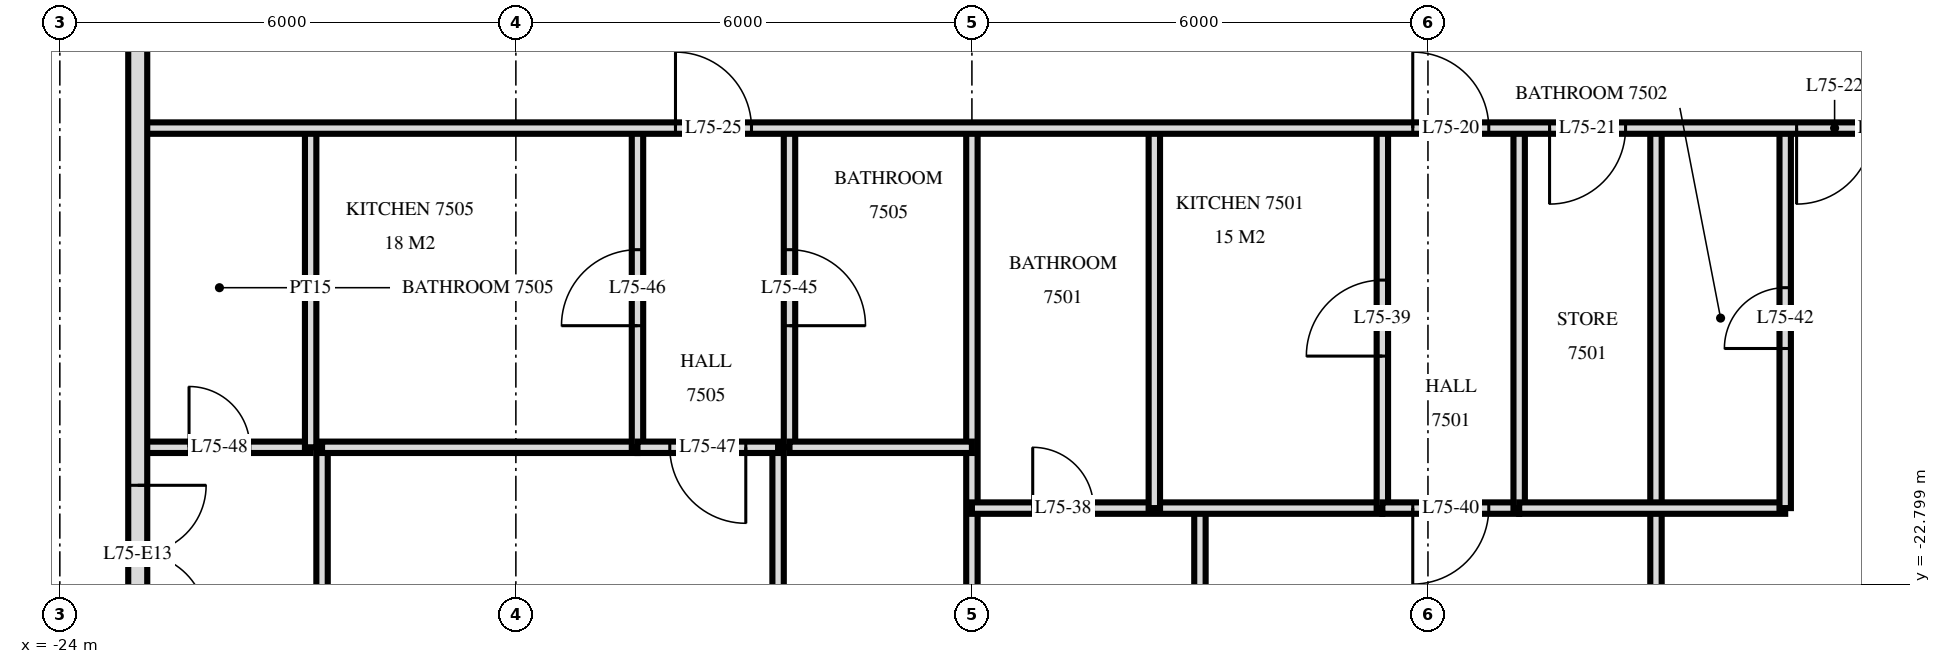
"""IFC4 building model, lengths in metres.
Left out: names, types, materials, properties, quantities, classifications, styles, units other than length and angle.
Written with IfcOpenShell. Run it as: python <this file> out.ifc"""

import sys

from ifc_helpers import new_model, si_unit, direction, frame, frame_2d, origin, place, context, subcontext, project, spatial, rectangle, extrude, element, fill, save


model = new_model("IFC4")
c1 = context("Model", 3, precision=1e-05, world=origin(), true_north=direction((0.0, 1.0)))
c2 = subcontext(c1, "Body", "Model", "MODEL_VIEW")
j1 = project(units=[si_unit("LENGTHUNIT", "METRE"), si_unit("PLANEANGLEUNIT", "RADIAN")], contexts=[c1])
p1 = place(None, origin())
s1 = spatial("IfcSite", under=j1, at=p1, CompositionType="ELEMENT")
p2 = place(p1, origin())
s2 = spatial("IfcBuilding", under=s1, at=p2, CompositionType="ELEMENT")
p3 = place(p2, frame((0.0, 0.0, 284.1)))
s3 = spatial("IfcBuildingStorey", under=s2, at=p3, CompositionType="ELEMENT", Elevation=284.1)
p4 = place(p3, frame((-22.975, -3.325, 0.0), z_axis=(0.0, 0.0, 1.0), x_axis=(0.0, -1.0, 0.0)))
e1 = element("IfcWall", 1, at=p4, inside=s3, PredefinedType="SOLIDWALL", context=c2, shape_type="SweptSolid", body=[
    extrude(rectangle(XDim=25.951, YDim=0.25, at=frame_2d((12.975, 0.0))), origin(), (0.0, 0.0, 1.0), 3.22),
])
p5 = place(p4, frame((1.475, 0.0, 0.0)))
e2 = element("IfcOpeningElement", 2, at=p5, cuts=e1, PredefinedType="OPENING", context=c2, shape_type="SweptSolid", body=[
    extrude(rectangle(XDim=1.8, YDim=2.4, at=frame_2d((0.9, 1.2))), frame((0.0, 0.135, 0.0), z_axis=(0.0, -1.0, 0.0), x_axis=(1.0, 0.0, 0.0)), (0.0, 0.0, 1.0), 0.27),
])
p6 = place(p4, frame((7.975, 0.0, 0.0)))
e3 = element("IfcOpeningElement", 3, at=p6, cuts=e1, PredefinedType="OPENING", context=c2, shape_type="SweptSolid", body=[
    extrude(rectangle(XDim=1.8, YDim=2.4, at=frame_2d((0.9, 1.2))), frame((0.0, 0.135, 0.0), z_axis=(0.0, -1.0, 0.0), x_axis=(1.0, 0.0, 0.0)), (0.0, 0.0, 1.0), 0.27),
])
p7 = place(p4, frame((18.175, 0.0, 0.0)))
e4 = element("IfcOpeningElement", 4, at=p7, cuts=e1, PredefinedType="OPENING", context=c2, shape_type="SweptSolid", body=[
    extrude(rectangle(XDim=1.8, YDim=2.4, at=frame_2d((0.9, 1.2))), frame((0.0, 0.135, 0.0), z_axis=(0.0, -1.0, 0.0), x_axis=(1.0, 0.0, 0.0)), (0.0, 0.0, 1.0), 0.27),
])
p8 = place(p4, frame((21.075, 0.0, 0.0)))
e5 = element("IfcOpeningElement", 5, at=p8, cuts=e1, PredefinedType="OPENING", context=c2, shape_type="SweptSolid", body=[
    extrude(rectangle(XDim=1.8, YDim=2.4, at=frame_2d((0.9, 1.2))), frame((0.0, 0.135, 0.0), z_axis=(0.0, -1.0, 0.0), x_axis=(1.0, 0.0, 0.0)), (0.0, 0.0, 1.0), 0.27),
])
p9 = place(p4, frame((23.825, 0.0, 0.9)))
e6 = element("IfcOpeningElement", 6, at=p9, cuts=e1, PredefinedType="OPENING", context=c2, shape_type="SweptSolid", body=[
    extrude(rectangle(XDim=1.8, YDim=1.5, at=frame_2d((0.9, 0.75))), frame((0.0, 0.135, 0.0), z_axis=(0.0, -1.0, 0.0), x_axis=(1.0, 0.0, 0.0)), (0.0, 0.0, 1.0), 0.27),
])
p10 = place(p3, frame((-1.3, -21.8, 0.0), z_axis=(0.0, 0.0, 1.0), x_axis=(0.0, 1.0, 0.0)))
e7 = element("IfcWall", 7, at=p10, inside=s3, PredefinedType="PARTITIONING", context=c2, shape_type="SweptSolid", body=[
    extrude(rectangle(XDim=5.0, YDim=0.15, at=frame_2d((2.5, 0.0))), origin(), (0.0, 0.0, 1.0), 3.22),
])
p11 = place(p10, frame((2.1, 0.0, 0.0)))
e8 = element("IfcOpeningElement", 8, at=p11, cuts=e7, PredefinedType="OPENING", context=c2, shape_type="SweptSolid", body=[
    extrude(rectangle(XDim=0.8, YDim=2.1, at=frame_2d((0.4, 1.05))), frame((0.0, 0.085, 0.0), z_axis=(0.0, -1.0, 0.0), x_axis=(1.0, 0.0, 0.0)), (0.0, 0.0, 1.0), 0.17),
])
p12 = place(p3, frame((-3.0, -33.62, 0.0), z_axis=(0.0, 0.0, 1.0), x_axis=(0.0, 1.0, 0.0)))
e9 = element("IfcWall", 9, at=p12, inside=s3, PredefinedType="PARTITIONING", context=c2, shape_type="SweptSolid", body=[
    extrude(rectangle(XDim=16.82, YDim=0.15, at=frame_2d((8.41, 0.0))), origin(), (0.0, 0.0, 1.0), 3.22),
])
p13 = place(p3, frame((-4.8, -21.8, 0.0), z_axis=(0.0, 0.0, 1.0), x_axis=(0.0, 1.0, 0.0)))
e10 = element("IfcWall", 10, at=p13, inside=s3, PredefinedType="PARTITIONING", context=c2, shape_type="SweptSolid", body=[
    extrude(rectangle(XDim=5.0, YDim=0.15, at=frame_2d((2.5, 0.0))), origin(), (0.0, 0.0, 1.0), 3.22),
])
p14 = place(p3, frame((-6.6, -21.8, 0.0), z_axis=(0.0, 0.0, 1.0), x_axis=(0.0, 1.0, 0.0)))
e11 = element("IfcWall", 11, at=p14, inside=s3, PredefinedType="PARTITIONING", context=c2, shape_type="SweptSolid", body=[
    extrude(rectangle(XDim=5.0, YDim=0.15, at=frame_2d((2.5, 0.0))), origin(), (0.0, 0.0, 1.0), 3.22),
])
p15 = place(p14, frame((2.0, 0.0, 0.0)))
e12 = element("IfcOpeningElement", 12, at=p15, cuts=e11, PredefinedType="OPENING", context=c2, shape_type="SweptSolid", body=[
    extrude(rectangle(XDim=1.0, YDim=2.1, at=frame_2d((0.5, 1.05))), frame((0.0, 0.085, 0.0), z_axis=(0.0, -1.0, 0.0), x_axis=(1.0, 0.0, 0.0)), (0.0, 0.0, 1.0), 0.17),
])
p16 = place(p3, frame((-9.0, -33.62, 0.0), z_axis=(0.0, 0.0, 1.0), x_axis=(0.0, 1.0, 0.0)))
e13 = element("IfcWall", 13, at=p16, inside=s3, PredefinedType="PARTITIONING", context=c2, shape_type="SweptSolid", body=[
    extrude(rectangle(XDim=11.82, YDim=0.15, at=frame_2d((5.91, 0.0))), origin(), (0.0, 0.0, 1.0), 3.22),
])
p17 = place(p16, frame((5.37, 0.0, 0.0)))
e14 = element("IfcOpeningElement", 14, at=p17, cuts=e13, PredefinedType="OPENING", context=c2, shape_type="SweptSolid", body=[
    extrude(rectangle(XDim=0.9, YDim=2.1, at=frame_2d((0.45, 1.05))), frame((0.0, 0.085, 0.0), z_axis=(0.0, -1.0, 0.0), x_axis=(1.0, 0.0, 0.0)), (0.0, 0.0, 1.0), 0.17),
])
p18 = place(p3, frame((-9.6, -21.8, 0.0), z_axis=(0.0, 0.0, 1.0), x_axis=(0.0, 1.0, 0.0)))
e15 = element("IfcWall", 15, at=p18, inside=s3, PredefinedType="PARTITIONING", context=c2, shape_type="SweptSolid", body=[
    extrude(rectangle(XDim=5.0, YDim=0.15, at=frame_2d((2.5, 0.0))), origin(), (0.0, 0.0, 1.0), 3.22),
])
p19 = place(p3, frame((-12.0, -33.62, 0.0), z_axis=(0.0, 0.0, 1.0), x_axis=(0.0, 1.0, 0.0)))
e16 = element("IfcWall", 16, at=p19, inside=s3, PredefinedType="PARTITIONING", context=c2, shape_type="SweptSolid", body=[
    extrude(rectangle(XDim=16.82, YDim=0.15, at=frame_2d((8.41, 0.0))), origin(), (0.0, 0.0, 1.0), 3.22),
])
p20 = place(p3, frame((-14.4, -21.0, 0.0), z_axis=(0.0, 0.0, 1.0), x_axis=(0.0, 1.0, 0.0)))
e17 = element("IfcWall", 17, at=p20, inside=s3, PredefinedType="PARTITIONING", context=c2, shape_type="SweptSolid", body=[
    extrude(rectangle(XDim=4.2, YDim=0.15, at=frame_2d((2.1, 0.0))), origin(), (0.0, 0.0, 1.0), 3.22),
])
p21 = place(p20, frame((1.6, 0.0, 0.0)))
e18 = element("IfcOpeningElement", 18, at=p21, cuts=e17, PredefinedType="OPENING", context=c2, shape_type="SweptSolid", body=[
    extrude(rectangle(XDim=1.0, YDim=2.1, at=frame_2d((0.5, 1.05))), frame((0.0, 0.085, 0.0), z_axis=(0.0, -1.0, 0.0), x_axis=(1.0, 0.0, 0.0)), (0.0, 0.0, 1.0), 0.17),
])
p22 = place(p3, frame((-14.55, -33.62, 0.0), z_axis=(0.0, 0.0, 1.0), x_axis=(0.0, 1.0, 0.0)))
e19 = element("IfcWall", 19, at=p22, inside=s3, PredefinedType="PARTITIONING", context=c2, shape_type="SweptSolid", body=[
    extrude(rectangle(XDim=12.62, YDim=0.15, at=frame_2d((6.31, 0.0))), origin(), (0.0, 0.0, 1.0), 3.22),
])
p23 = place(p22, frame((5.77, 0.0, 0.0)))
e20 = element("IfcOpeningElement", 20, at=p23, cuts=e19, PredefinedType="OPENING", context=c2, shape_type="SweptSolid", body=[
    extrude(rectangle(XDim=0.9, YDim=2.1, at=frame_2d((0.45, 1.05))), frame((0.0, 0.085, 0.0), z_axis=(0.0, -1.0, 0.0), x_axis=(1.0, 0.0, 0.0)), (0.0, 0.0, 1.0), 0.17),
])
p24 = place(p3, frame((-16.4, -21.0, 0.0), z_axis=(0.0, 0.0, 1.0), x_axis=(0.0, 1.0, 0.0)))
e21 = element("IfcWall", 21, at=p24, inside=s3, PredefinedType="PARTITIONING", context=c2, shape_type="SweptSolid", body=[
    extrude(rectangle(XDim=4.2, YDim=0.15, at=frame_2d((2.1, 0.0))), origin(), (0.0, 0.0, 1.0), 3.22),
])
p25 = place(p24, frame((1.6, 0.0, 0.0)))
e22 = element("IfcOpeningElement", 22, at=p25, cuts=e21, PredefinedType="OPENING", context=c2, shape_type="SweptSolid", body=[
    extrude(rectangle(XDim=1.0, YDim=2.1, at=frame_2d((0.5, 1.05))), frame((0.0, 0.085, 0.0), z_axis=(0.0, -1.0, 0.0), x_axis=(1.0, 0.0, 0.0)), (0.0, 0.0, 1.0), 0.17),
])
p26 = place(p3, frame((-20.55, -33.017, 0.0), z_axis=(0.0, 0.0, 1.0), x_axis=(0.0, 1.0, 0.0)))
e23 = element("IfcWall", 23, at=p26, inside=s3, PredefinedType="PARTITIONING", context=c2, shape_type="SweptSolid", body=[
    extrude(rectangle(XDim=12.017, YDim=0.15, at=frame_2d((6.008, 0.0))), origin(), (0.0, 0.0, 1.0), 3.22),
])
p27 = place(p26, frame((5.432, 0.0, 0.0)))
e24 = element("IfcOpeningElement", 24, at=p27, cuts=e23, PredefinedType="OPENING", context=c2, shape_type="SweptSolid", body=[
    extrude(rectangle(XDim=0.9, YDim=2.1, at=frame_2d((0.45, 1.05))), frame((0.0, 0.085, 0.0), z_axis=(0.0, -1.0, 0.0), x_axis=(1.0, 0.0, 0.0)), (0.0, 0.0, 1.0), 0.17),
])
p28 = place(p3, frame((-20.7, -21.0, 0.0), z_axis=(0.0, 0.0, 1.0), x_axis=(0.0, 1.0, 0.0)))
e25 = element("IfcWall", 25, at=p28, inside=s3, PredefinedType="PARTITIONING", context=c2, shape_type="SweptSolid", body=[
    extrude(rectangle(XDim=4.2, YDim=0.15, at=frame_2d((2.1, 0.0))), origin(), (0.0, 0.0, 1.0), 3.22),
])
p29 = place(p3, frame((-6.6, -21.8, 0.0), z_axis=(0.0, 0.0, 1.0), x_axis=(1.0, 0.0, 0.0)))
e26 = element("IfcWall", 26, at=p29, inside=s3, PredefinedType="PARTITIONING", context=c2, shape_type="SweptSolid", body=[
    extrude(rectangle(XDim=1.8, YDim=0.15, at=frame_2d((0.9, 0.0))), origin(), (0.0, 0.0, 1.0), 3.22),
])
p30 = place(p29, frame((0.4, 0.0, 0.0)))
e27 = element("IfcOpeningElement", 27, at=p30, cuts=e26, PredefinedType="OPENING", context=c2, shape_type="SweptSolid", body=[
    extrude(rectangle(XDim=1.0, YDim=2.1, at=frame_2d((0.5, 1.05))), frame((0.0, 0.085, 0.0), z_axis=(0.0, -1.0, 0.0), x_axis=(1.0, 0.0, 0.0)), (0.0, 0.0, 1.0), 0.17),
])
p31 = place(p3, frame((-12.0, -21.8, 0.0), z_axis=(0.0, 0.0, 1.0), x_axis=(1.0, 0.0, 0.0)))
e28 = element("IfcWall", 28, at=p31, inside=s3, PredefinedType="PARTITIONING", context=c2, shape_type="SweptSolid", body=[
    extrude(rectangle(XDim=5.4, YDim=0.15, at=frame_2d((2.7, 0.0))), origin(), (0.0, 0.0, 1.0), 3.22),
])
p32 = place(p31, frame((0.8, 0.0, 0.0)))
e29 = element("IfcOpeningElement", 29, at=p32, cuts=e28, PredefinedType="OPENING", context=c2, shape_type="SweptSolid", body=[
    extrude(rectangle(XDim=0.8, YDim=2.1, at=frame_2d((0.4, 1.05))), frame((0.0, 0.085, 0.0), z_axis=(0.0, -1.0, 0.0), x_axis=(1.0, 0.0, 0.0)), (0.0, 0.0, 1.0), 0.17),
])
p33 = place(p3, frame((-4.8, -21.8, 0.0), z_axis=(0.0, 0.0, 1.0), x_axis=(1.0, 0.0, 0.0)))
e30 = element("IfcWall", 30, at=p33, inside=s3, PredefinedType="PARTITIONING", context=c2, shape_type="SweptSolid", body=[
    extrude(rectangle(XDim=3.5, YDim=0.15, at=frame_2d((1.75, 0.0))), origin(), (0.0, 0.0, 1.0), 3.22),
])
p34 = place(p3, frame((-16.4, -21.0, 0.0), z_axis=(0.0, 0.0, 1.0), x_axis=(1.0, 0.0, 0.0)))
e31 = element("IfcWall", 31, at=p34, inside=s3, PredefinedType="PARTITIONING", context=c2, shape_type="SweptSolid", body=[
    extrude(rectangle(XDim=1.85, YDim=0.15, at=frame_2d((0.925, 0.0))), origin(), (0.0, 0.0, 1.0), 3.22),
])
p35 = place(p34, frame((0.425, 0.0, 0.0)))
e32 = element("IfcOpeningElement", 32, at=p35, cuts=e31, PredefinedType="OPENING", context=c2, shape_type="SweptSolid", body=[
    extrude(rectangle(XDim=1.0, YDim=2.1, at=frame_2d((0.5, 1.05))), frame((0.0, 0.085, 0.0), z_axis=(0.0, -1.0, 0.0), x_axis=(1.0, 0.0, 0.0)), (0.0, 0.0, 1.0), 0.17),
])
p36 = place(p3, frame((-22.92, -21.0, 0.0), z_axis=(0.0, 0.0, 1.0), x_axis=(1.0, 0.0, 0.0)))
e33 = element("IfcWall", 33, at=p36, inside=s3, PredefinedType="PARTITIONING", context=c2, shape_type="SweptSolid", body=[
    extrude(rectangle(XDim=2.22, YDim=0.15, at=frame_2d((1.11, 0.0))), origin(), (0.0, 0.0, 1.0), 3.22),
])
p37 = place(p36, frame((0.62, 0.0, 0.0)))
e34 = element("IfcOpeningElement", 34, at=p37, cuts=e33, PredefinedType="OPENING", context=c2, shape_type="SweptSolid", body=[
    extrude(rectangle(XDim=0.8, YDim=2.1, at=frame_2d((0.4, 1.05))), frame((0.0, 0.085, 0.0), z_axis=(0.0, -1.0, 0.0), x_axis=(1.0, 0.0, 0.0)), (0.0, 0.0, 1.0), 0.17),
])
p38 = place(p3, frame((-20.55, -21.0, 0.0), z_axis=(0.0, 0.0, 1.0), x_axis=(1.0, 0.0, 0.0)))
e35 = element("IfcWall", 35, at=p38, inside=s3, PredefinedType="PARTITIONING", context=c2, shape_type="SweptSolid", body=[
    extrude(rectangle(XDim=4.15, YDim=0.15, at=frame_2d((2.075, 0.0))), origin(), (0.0, 0.0, 1.0), 3.22),
])
p39 = place(p3, frame((-14.4, -21.0, 0.0), z_axis=(0.0, 0.0, 1.0), x_axis=(1.0, 0.0, 0.0)))
e36 = element("IfcWall", 36, at=p39, inside=s3, PredefinedType="PARTITIONING", context=c2, shape_type="SweptSolid", body=[
    extrude(rectangle(XDim=2.4, YDim=0.15, at=frame_2d((1.2, 0.0))), origin(), (0.0, 0.0, 1.0), 3.22),
])
p40 = place(p3, frame((-22.92, -16.8, 0.0), z_axis=(0.0, 0.0, 1.0), x_axis=(1.0, 0.0, 0.0)))
e37 = element("IfcWall", 37, at=p40, inside=s3, PredefinedType="PARTITIONING", context=c2, shape_type="SweptSolid", body=[
    extrude(rectangle(XDim=45.84, YDim=0.15, at=frame_2d((22.92, 0.0))), origin(), (0.0, 0.0, 1.0), 3.22),
])
p41 = place(p40, frame((16.72, 0.0, 0.0)))
e38 = element("IfcOpeningElement", 38, at=p41, cuts=e37, PredefinedType="OPENING", context=c2, shape_type="SweptSolid", body=[
    extrude(rectangle(XDim=1.0, YDim=2.1, at=frame_2d((0.5, 1.05))), frame((0.0, 0.085, 0.0), z_axis=(0.0, -1.0, 0.0), x_axis=(1.0, 0.0, 0.0)), (0.0, 0.0, 1.0), 0.17),
])
p42 = place(p40, frame((18.52, 0.0, 0.0)))
e39 = element("IfcOpeningElement", 39, at=p42, cuts=e37, PredefinedType="OPENING", context=c2, shape_type="SweptSolid", body=[
    extrude(rectangle(XDim=1.0, YDim=2.1, at=frame_2d((0.5, 1.05))), frame((0.0, 0.085, 0.0), z_axis=(0.0, -1.0, 0.0), x_axis=(1.0, 0.0, 0.0)), (0.0, 0.0, 1.0), 0.17),
])
p43 = place(p40, frame((21.77, 0.0, 0.0)))
e40 = element("IfcOpeningElement", 40, at=p43, cuts=e37, PredefinedType="OPENING", context=c2, shape_type="SweptSolid", body=[
    extrude(rectangle(XDim=1.0, YDim=2.1, at=frame_2d((0.5, 1.05))), frame((0.0, 0.085, 0.0), z_axis=(0.0, -1.0, 0.0), x_axis=(1.0, 0.0, 0.0)), (0.0, 0.0, 1.0), 0.17),
])
p44 = place(p40, frame((23.07, 0.0, 0.0)))
e41 = element("IfcOpeningElement", 41, at=p44, cuts=e37, PredefinedType="OPENING", context=c2, shape_type="SweptSolid", body=[
    extrude(rectangle(XDim=1.0, YDim=2.1, at=frame_2d((0.5, 1.05))), frame((0.0, 0.085, 0.0), z_axis=(0.0, -1.0, 0.0), x_axis=(1.0, 0.0, 0.0)), (0.0, 0.0, 1.0), 0.17),
])
p45 = place(p40, frame((27.77, 0.0, 0.0)))
e42 = element("IfcOpeningElement", 42, at=p45, cuts=e37, PredefinedType="OPENING", context=c2, shape_type="SweptSolid", body=[
    extrude(rectangle(XDim=1.0, YDim=2.1, at=frame_2d((0.5, 1.05))), frame((0.0, 0.085, 0.0), z_axis=(0.0, -1.0, 0.0), x_axis=(1.0, 0.0, 0.0)), (0.0, 0.0, 1.0), 0.17),
])
p46 = place(p40, frame((7.02, 0.0, 0.0)))
e43 = element("IfcOpeningElement", 43, at=p46, cuts=e37, PredefinedType="OPENING", context=c2, shape_type="SweptSolid", body=[
    extrude(rectangle(XDim=1.0, YDim=2.1, at=frame_2d((0.5, 1.05))), frame((0.0, 0.085, 0.0), z_axis=(0.0, -1.0, 0.0), x_axis=(1.0, 0.0, 0.0)), (0.0, 0.0, 1.0), 0.17),
])
p47 = place(p40, frame((35.42, 0.0, 0.0)))
e44 = element("IfcOpeningElement", 44, at=p47, cuts=e37, PredefinedType="OPENING", context=c2, shape_type="SweptSolid", body=[
    extrude(rectangle(XDim=1.0, YDim=2.1, at=frame_2d((0.5, 1.05))), frame((0.0, 0.085, 0.0), z_axis=(0.0, -1.0, 0.0), x_axis=(1.0, 0.0, 0.0)), (0.0, 0.0, 1.0), 0.17),
])
p48 = place(p40, frame((42.19, 0.0, 0.0)))
e45 = element("IfcOpeningElement", 45, at=p48, cuts=e37, PredefinedType="OPENING", context=c2, shape_type="SweptSolid", body=[
    extrude(rectangle(XDim=1.0, YDim=2.1, at=frame_2d((0.5, 1.05))), frame((0.0, 0.085, 0.0), z_axis=(0.0, -1.0, 0.0), x_axis=(1.0, 0.0, 0.0)), (0.0, 0.0, 1.0), 0.17),
])
p49 = place(p7, origin())
e46 = element("IfcDoor", 46, at=p49, inside=s3, OperationType="DOUBLE_DOOR_SINGLE_SWING", PredefinedType="DOOR", context=c2, shape_type="SweptSolid", body=[
    extrude(rectangle(XDim=1.8, YDim=2.4, at=frame_2d((0.9, 1.2))), frame((0.0, 0.025, 0.0), z_axis=(0.0, -1.0, 0.0), x_axis=(1.0, 0.0, 0.0)), (0.0, 0.0, 1.0), 0.05),
])
fill(e4, e46)
p50 = place(p41, origin())
e47 = element("IfcDoor", 47, at=p50, inside=s3, OperationType="SINGLE_SWING_RIGHT", PredefinedType="DOOR", context=c2, shape_type="SweptSolid", body=[
    extrude(rectangle(XDim=1.0, YDim=2.1, at=frame_2d((0.5, 1.05))), frame((0.0, 0.025, 0.0), z_axis=(0.0, -1.0, 0.0), x_axis=(1.0, 0.0, 0.0)), (0.0, 0.0, 1.0), 0.05),
])
fill(e38, e47)
p51 = place(p42, frame((0.5, 0.0, 0.0), z_axis=(0.0, 0.0, 1.0), x_axis=(-1.0, 0.0, 0.0)))
e48 = element("IfcDoor", 48, at=p51, inside=s3, OperationType="SINGLE_SWING_LEFT", PredefinedType="DOOR", context=c2, shape_type="SweptSolid", body=[
    extrude(rectangle(XDim=1.0, YDim=2.1, at=frame_2d((0.0, 1.05))), frame((0.0, -0.025, 0.0), z_axis=(0.0, 1.0, 0.0), x_axis=(-1.0, 0.0, 0.0)), (0.0, 0.0, 1.0), 0.05),
])
fill(e39, e48)
p52 = place(p43, frame((0.5, 0.0, 0.0), z_axis=(0.0, 0.0, 1.0), x_axis=(-1.0, 0.0, 0.0)))
e49 = element("IfcDoor", 49, at=p52, inside=s3, OperationType="SINGLE_SWING_LEFT", PredefinedType="DOOR", context=c2, shape_type="SweptSolid", body=[
    extrude(rectangle(XDim=1.0, YDim=2.1, at=frame_2d((0.0, 1.05))), frame((0.0, -0.025, 0.0), z_axis=(0.0, 1.0, 0.0), x_axis=(-1.0, 0.0, 0.0)), (0.0, 0.0, 1.0), 0.05),
])
fill(e40, e49)
p53 = place(p46, origin())
e50 = element("IfcDoor", 50, at=p53, inside=s3, OperationType="SINGLE_SWING_RIGHT", PredefinedType="DOOR", context=c2, shape_type="SweptSolid", body=[
    extrude(rectangle(XDim=1.0, YDim=2.1, at=frame_2d((0.5, 1.05))), frame((0.0, 0.025, 0.0), z_axis=(0.0, -1.0, 0.0), x_axis=(1.0, 0.0, 0.0)), (0.0, 0.0, 1.0), 0.05),
])
fill(e43, e50)
p54 = place(p32, origin())
e51 = element("IfcDoor", 51, at=p54, inside=s3, OperationType="SINGLE_SWING_RIGHT", PredefinedType="DOOR", context=c2, shape_type="SweptSolid", body=[
    extrude(rectangle(XDim=0.8, YDim=2.1, at=frame_2d((0.4, 1.05))), frame((0.0, 0.025, 0.0), z_axis=(0.0, -1.0, 0.0), x_axis=(1.0, 0.0, 0.0)), (0.0, 0.0, 1.0), 0.05),
])
fill(e29, e51)
p55 = place(p15, origin())
e52 = element("IfcDoor", 52, at=p55, inside=s3, OperationType="SINGLE_SWING_RIGHT", PredefinedType="DOOR", context=c2, shape_type="SweptSolid", body=[
    extrude(rectangle(XDim=1.0, YDim=2.1, at=frame_2d((0.5, 1.05))), frame((0.0, 0.025, 0.0), z_axis=(0.0, -1.0, 0.0), x_axis=(1.0, 0.0, 0.0)), (0.0, 0.0, 1.0), 0.05),
])
fill(e12, e52)
p56 = place(p30, frame((0.5, 0.0, 0.0), z_axis=(0.0, 0.0, 1.0), x_axis=(-1.0, 0.0, 0.0)))
e53 = element("IfcDoor", 53, at=p56, inside=s3, OperationType="SINGLE_SWING_LEFT", PredefinedType="DOOR", context=c2, shape_type="SweptSolid", body=[
    extrude(rectangle(XDim=1.0, YDim=2.1, at=frame_2d((0.0, 1.05))), frame((0.0, -0.025, 0.0), z_axis=(0.0, 1.0, 0.0), x_axis=(-1.0, 0.0, 0.0)), (0.0, 0.0, 1.0), 0.05),
])
fill(e27, e53)
p57 = place(p11, origin())
e54 = element("IfcDoor", 54, at=p57, inside=s3, OperationType="SINGLE_SWING_RIGHT", PredefinedType="DOOR", context=c2, shape_type="SweptSolid", body=[
    extrude(rectangle(XDim=0.8, YDim=2.1, at=frame_2d((0.4, 1.05))), frame((0.0, 0.025, 0.0), z_axis=(0.0, -1.0, 0.0), x_axis=(1.0, 0.0, 0.0)), (0.0, 0.0, 1.0), 0.05),
])
fill(e8, e54)
p58 = place(p21, frame((0.5, 0.0, 0.0), z_axis=(0.0, 0.0, 1.0), x_axis=(-1.0, 0.0, 0.0)))
e55 = element("IfcDoor", 55, at=p58, inside=s3, OperationType="SINGLE_SWING_LEFT", PredefinedType="DOOR", context=c2, shape_type="SweptSolid", body=[
    extrude(rectangle(XDim=1.0, YDim=2.1, at=frame_2d((0.0, 1.05))), frame((0.0, -0.025, 0.0), z_axis=(0.0, 1.0, 0.0), x_axis=(-1.0, 0.0, 0.0)), (0.0, 0.0, 1.0), 0.05),
])
fill(e18, e55)
p59 = place(p25, origin())
e56 = element("IfcDoor", 56, at=p59, inside=s3, OperationType="SINGLE_SWING_RIGHT", PredefinedType="DOOR", context=c2, shape_type="SweptSolid", body=[
    extrude(rectangle(XDim=1.0, YDim=2.1, at=frame_2d((0.5, 1.05))), frame((0.0, 0.025, 0.0), z_axis=(0.0, -1.0, 0.0), x_axis=(1.0, 0.0, 0.0)), (0.0, 0.0, 1.0), 0.05),
])
fill(e22, e56)
p60 = place(p35, frame((0.5, 0.0, 0.0), z_axis=(0.0, 0.0, 1.0), x_axis=(-1.0, 0.0, 0.0)))
e57 = element("IfcDoor", 57, at=p60, inside=s3, OperationType="SINGLE_SWING_RIGHT", PredefinedType="DOOR", context=c2, shape_type="SweptSolid", body=[
    extrude(rectangle(XDim=1.0, YDim=2.1, at=frame_2d((0.0, 1.05))), frame((0.0, -0.025, 0.0), z_axis=(0.0, 1.0, 0.0), x_axis=(-1.0, 0.0, 0.0)), (0.0, 0.0, 1.0), 0.05),
])
fill(e32, e57)
p61 = place(p37, origin())
e58 = element("IfcDoor", 58, at=p61, inside=s3, OperationType="SINGLE_SWING_RIGHT", PredefinedType="DOOR", context=c2, shape_type="SweptSolid", body=[
    extrude(rectangle(XDim=0.8, YDim=2.1, at=frame_2d((0.4, 1.05))), frame((0.0, 0.025, 0.0), z_axis=(0.0, -1.0, 0.0), x_axis=(1.0, 0.0, 0.0)), (0.0, 0.0, 1.0), 0.05),
])
fill(e34, e58)
save(model, sys.argv[1])
